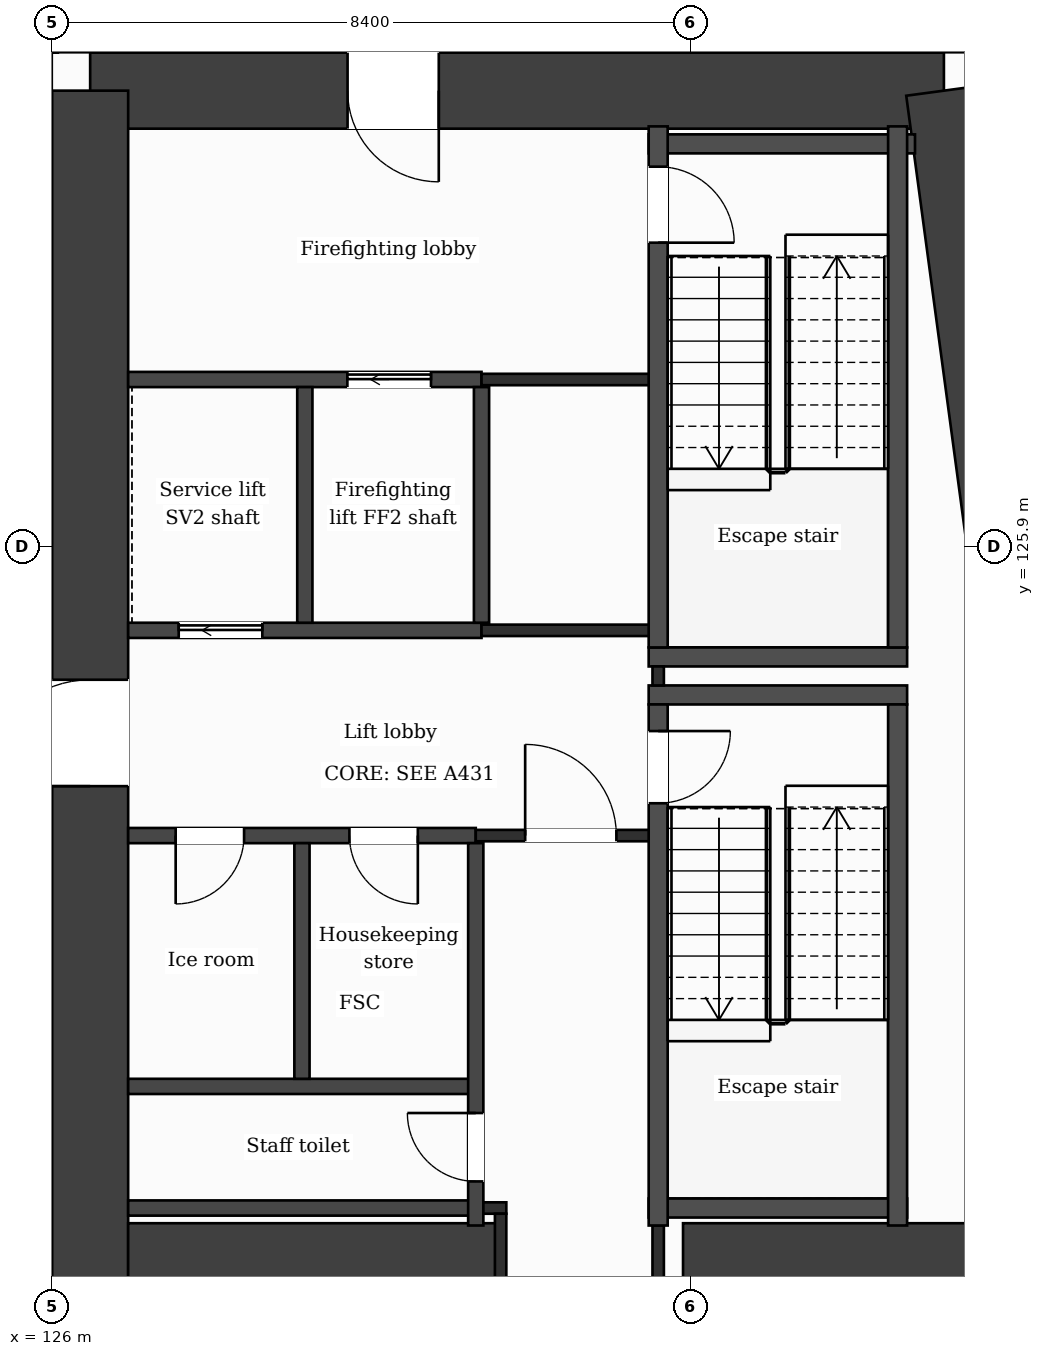
"""IFC4 building model, lengths in metres.
Left out: names, types, materials, properties, quantities, classifications, styles, units other than length and angle.
Written with IfcOpenShell. Run it as: python <this file> out.ifc"""

import sys

from ifc_helpers import new_model, si_unit, direction, frame, frame_2d, origin, place, context, subcontext, project, spatial, rectangle, extrude, element, fill, save


model = new_model("IFC4")
c1 = context("Model", 3, precision=1e-05, world=origin(), true_north=direction((0.0, 1.0)))
c2 = subcontext(c1, "Body", "Model", "MODEL_VIEW")
j1 = project(units=[si_unit("LENGTHUNIT", "METRE"), si_unit("PLANEANGLEUNIT", "RADIAN")], contexts=[c1])
p1 = place(None, origin())
s1 = spatial("IfcSite", under=j1, at=p1, CompositionType="ELEMENT")
p2 = place(p1, origin())
s2 = spatial("IfcBuilding", under=s1, at=p2, CompositionType="ELEMENT")
p3 = place(p2, frame((0.0, 0.0, 128.0)))
s3 = spatial("IfcBuildingStorey", under=s2, at=p3, CompositionType="ELEMENT", Elevation=128.0)
p4 = place(p3, frame((126.5, 131.9, 0.0), z_axis=(0.0, 0.0, 1.0), x_axis=(1.0, 0.0, 0.0)))
e1 = element("IfcWall", 1, at=p4, inside=s3, PredefinedType="SHEAR", context=c2, shape_type="SweptSolid", body=[
    extrude(rectangle(XDim=11.232, YDim=1.0, at=frame_2d((5.616, 0.0))), origin(), (0.0, 0.0, 1.0), 3.7),
])
p5 = place(p4, frame((3.386, 0.0, 0.0)))
e2 = element("IfcOpeningElement", 2, at=p5, cuts=e1, PredefinedType="OPENING", context=c2, shape_type="SweptSolid", body=[
    extrude(rectangle(XDim=1.2, YDim=2.1, at=frame_2d((0.6, 1.05))), frame((0.0, 0.51, 0.0), z_axis=(0.0, -1.0, 0.0), x_axis=(1.0, 0.0, 0.0)), (0.0, 0.0, 1.0), 1.02),
])
p6 = place(p3, frame((137.732, 131.9, 0.0), z_axis=(0.0, 0.0, 1.0), x_axis=(0.133411141623, -0.991060778808, 0.0)))
e3 = element("IfcWall", 3, at=p6, inside=s3, PredefinedType="SHEAR", context=c2, shape_type="SweptSolid", body=[
    extrude(rectangle(XDim=21.189, YDim=1.0, at=frame_2d((10.595, 0.0))), origin(), (0.0, 0.0, 1.0), 3.7),
])
p7 = place(p3, frame((126.5, 110.9, 0.0), z_axis=(0.0, 0.0, 1.0), x_axis=(0.0, 1.0, 0.0)))
e4 = element("IfcWall", 4, at=p7, inside=s3, PredefinedType="SHEAR", context=c2, shape_type="SweptSolid", body=[
    extrude(rectangle(XDim=21.0, YDim=1.0, at=frame_2d((10.5, 0.0))), origin(), (0.0, 0.0, 1.0), 3.7),
])
p8 = place(p7, frame((11.85, 0.0, 0.0)))
e5 = element("IfcOpeningElement", 5, at=p8, cuts=e4, PredefinedType="OPENING", context=c2, shape_type="SweptSolid", body=[
    extrude(rectangle(XDim=1.4, YDim=2.1, at=frame_2d((0.7, 1.05))), frame((0.0, 0.51, 0.0), z_axis=(0.0, -1.0, 0.0), x_axis=(1.0, 0.0, 0.0)), (0.0, 0.0, 1.0), 1.02),
])
p9 = place(p3, frame((127.0, 116.5, 0.0), z_axis=(0.0, 0.0, 1.0), x_axis=(1.0, 0.0, 0.0)))
e6 = element("IfcWall", 6, at=p9, inside=s3, PredefinedType="SHEAR", context=c2, shape_type="SweptSolid", body=[
    extrude(rectangle(XDim=4.9, YDim=1.0, at=frame_2d((2.45, 0.0))), origin(), (0.0, 0.0, 1.0), 3.7),
])
p10 = place(p3, frame((134.3, 116.5, 0.0), z_axis=(0.0, 0.0, 1.0), x_axis=(1.0, 0.0, 0.0)))
e7 = element("IfcWall", 7, at=p10, inside=s3, PredefinedType="SHEAR", context=c2, shape_type="SweptSolid", body=[
    extrude(rectangle(XDim=5.077, YDim=1.0, at=frame_2d((2.539, 0.0))), origin(), (0.0, 0.0, 1.0), 3.7),
])
p11 = place(p3, frame((136.504, 132.4, 0.0), z_axis=(0.0, 0.0, 1.0), x_axis=(-0.133399697462, 0.99106231929, 0.0)))
e8 = element("IfcWall", 8, at=p11, inside=s3, PredefinedType="SOLIDWALL", context=c2, shape_type="SweptSolid", body=[
    extrude(rectangle(XDim=6.74, YDim=0.3, at=frame_2d((3.37, 0.0))), origin(), (0.0, 0.0, 1.0), 3.38),
])
p12 = place(p11, frame((1.115, 0.0, 0.0)))
e9 = element("IfcOpeningElement", 9, at=p12, cuts=e8, PredefinedType="OPENING", context=c2, shape_type="SweptSolid", body=[
    extrude(rectangle(XDim=1.2, YDim=2.4, at=frame_2d((0.6, 1.2))), frame((0.0, 0.16, 0.0), z_axis=(0.0, -1.0, 0.0), x_axis=(1.0, 0.0, 0.0)), (0.0, 0.0, 1.0), 0.32),
])
p13 = place(p11, frame((3.835, 0.0, 0.9)))
e10 = element("IfcOpeningElement", 10, at=p13, cuts=e8, PredefinedType="OPENING", context=c2, shape_type="SweptSolid", body=[
    extrude(rectangle(XDim=2.4, YDim=2.1, at=frame_2d((1.2, 1.05))), frame((0.0, 0.16, 0.0), z_axis=(0.0, -1.0, 0.0), x_axis=(1.0, 0.0, 0.0)), (0.0, 0.0, 1.0), 0.32),
])
p14 = place(p3, frame((127.0, 117.2, 0.0), z_axis=(0.0, 0.0, 1.0), x_axis=(1.0, 0.0, 0.0)))
e11 = element("IfcWall", 11, at=p14, inside=s3, PredefinedType="PARTITIONING", context=c2, shape_type="SweptSolid", body=[
    extrude(rectangle(XDim=4.573, YDim=0.2, at=frame_2d((2.287, 0.0))), origin(), (0.0, 0.0, 1.0), 3.38),
])
p15 = place(p3, frame((131.573, 117.2, 0.0), z_axis=(0.0, 0.0, 1.0), x_axis=(1.0, 0.0, 0.0)))
e12 = element("IfcWall", 12, at=p15, inside=s3, PredefinedType="PARTITIONING", context=c2, shape_type="SweptSolid", body=[
    extrude(rectangle(XDim=0.402, YDim=0.15, at=frame_2d((0.201, 0.0))), origin(), (0.0, 0.0, 1.0), 3.38),
])
p16 = place(p3, frame((133.848, 117.2, 0.0), z_axis=(0.0, 0.0, 1.0), x_axis=(1.0, 0.0, 0.0)))
e13 = element("IfcWall", 13, at=p16, inside=s3, PredefinedType="PARTITIONING", context=c2, shape_type="SweptSolid", body=[
    extrude(rectangle(XDim=3.4, YDim=0.25, at=frame_2d((1.7, 0.0))), origin(), (0.0, 0.0, 1.0), 3.38),
])
p17 = place(p3, frame((127.0, 118.8, 0.0), z_axis=(0.0, 0.0, 1.0), x_axis=(1.0, 0.0, 0.0)))
e14 = element("IfcWall", 14, at=p17, inside=s3, PredefinedType="PARTITIONING", context=c2, shape_type="SweptSolid", body=[
    extrude(rectangle(XDim=4.573, YDim=0.2, at=frame_2d((2.287, 0.0))), origin(), (0.0, 0.0, 1.0), 3.38),
])
p18 = place(p3, frame((127.0, 122.1, 0.0), z_axis=(0.0, 0.0, 1.0), x_axis=(1.0, 0.0, 0.0)))
e15 = element("IfcWall", 15, at=p18, inside=s3, PredefinedType="PARTITIONING", context=c2, shape_type="SweptSolid", body=[
    extrude(rectangle(XDim=4.573, YDim=0.2, at=frame_2d((2.287, 0.0))), origin(), (0.0, 0.0, 1.0), 3.38),
])
p19 = place(p18, frame((2.911, 0.0, 0.0)))
e16 = element("IfcOpeningElement", 16, at=p19, cuts=e15, PredefinedType="OPENING", context=c2, shape_type="SweptSolid", body=[
    extrude(rectangle(XDim=0.9, YDim=2.1, at=frame_2d((0.45, 1.05))), frame((0.0, 0.11, 0.0), z_axis=(0.0, -1.0, 0.0), x_axis=(1.0, 0.0, 0.0)), (0.0, 0.0, 1.0), 0.22),
])
p20 = place(p18, frame((0.625, 0.0, 0.0)))
e17 = element("IfcOpeningElement", 17, at=p20, cuts=e15, PredefinedType="OPENING", context=c2, shape_type="SweptSolid", body=[
    extrude(rectangle(XDim=0.9, YDim=2.1, at=frame_2d((0.45, 1.05))), frame((0.0, 0.11, 0.0), z_axis=(0.0, -1.0, 0.0), x_axis=(1.0, 0.0, 0.0)), (0.0, 0.0, 1.0), 0.22),
])
p21 = place(p3, frame((131.573, 122.1, 0.0), z_axis=(0.0, 0.0, 1.0), x_axis=(1.0, 0.0, 0.0)))
e18 = element("IfcWall", 18, at=p21, inside=s3, PredefinedType="PARTITIONING", context=c2, shape_type="SweptSolid", body=[
    extrude(rectangle(XDim=2.4, YDim=0.15, at=frame_2d((1.2, 0.0))), origin(), (0.0, 0.0, 1.0), 3.38),
])
p22 = place(p21, frame((0.65, 0.0, 0.0)))
e19 = element("IfcOpeningElement", 19, at=p22, cuts=e18, PredefinedType="OPENING", context=c2, shape_type="SweptSolid", body=[
    extrude(rectangle(XDim=1.2, YDim=2.1, at=frame_2d((0.6, 1.05))), frame((0.0, 0.085, 0.0), z_axis=(0.0, -1.0, 0.0), x_axis=(1.0, 0.0, 0.0)), (0.0, 0.0, 1.0), 0.17),
])
p23 = place(p3, frame((100.8, 122.45, 0.0), z_axis=(0.0, 0.0, 1.0), x_axis=(1.0, 0.0, 0.0)))
e20 = element("IfcWall", 20, at=p23, inside=s3, PredefinedType="PARTITIONING", context=c2, shape_type="SweptSolid", body=[
    extrude(rectangle(XDim=25.2, YDim=0.15, at=frame_2d((12.6, 0.0))), origin(), (0.0, 0.0, 1.0), 3.38),
])
for number, where, z_axis, x_axis in (
    (21, (133.848, 123.95, 0.0), (0.0, 0.0, 1.0), (1.0, 0.0, 0.0)),
    (22, (133.848, 124.45, 0.0), (0.0, 0.0, 1.0), (1.0, 0.0, 0.0)),
):
    element("IfcWall", number, at=place(p3, frame(where, z_axis=z_axis, x_axis=x_axis)), inside=s3, PredefinedType="PARTITIONING", context=c2, shape_type="SweptSolid", body=[
        extrude(rectangle(XDim=3.4, YDim=0.25, at=frame_2d((1.7, 0.0))), origin(), (0.0, 0.0, 1.0), 3.38),
    ])
p24 = place(p3, frame((100.8, 124.45, 0.0), z_axis=(0.0, 0.0, 1.0), x_axis=(1.0, 0.0, 0.0)))
e23 = element("IfcWall", 23, at=p24, inside=s3, PredefinedType="PARTITIONING", context=c2, shape_type="SweptSolid", body=[
    extrude(rectangle(XDim=25.2, YDim=0.15, at=frame_2d((12.6, 0.0))), origin(), (0.0, 0.0, 1.0), 3.38),
])
p25 = place(p24, frame((2.025, 0.0, 0.0)))
e24 = element("IfcOpeningElement", 24, at=p25, cuts=e23, PredefinedType="OPENING", context=c2, shape_type="SweptSolid", body=[
    extrude(rectangle(XDim=1.0, YDim=2.1, at=frame_2d((0.5, 1.05))), frame((0.0, 0.085, 0.0), z_axis=(0.0, -1.0, 0.0), x_axis=(1.0, 0.0, 0.0)), (0.0, 0.0, 1.0), 0.17),
])
p26 = place(p24, frame((12.1, 0.0, 0.0)))
e25 = element("IfcOpeningElement", 25, at=p26, cuts=e23, PredefinedType="OPENING", context=c2, shape_type="SweptSolid", body=[
    extrude(rectangle(XDim=1.0, YDim=2.1, at=frame_2d((0.5, 1.05))), frame((0.0, 0.085, 0.0), z_axis=(0.0, -1.0, 0.0), x_axis=(1.0, 0.0, 0.0)), (0.0, 0.0, 1.0), 0.17),
])
p27 = place(p24, frame((17.54, 0.0, 0.0)))
e26 = element("IfcOpeningElement", 26, at=p27, cuts=e23, PredefinedType="OPENING", context=c2, shape_type="SweptSolid", body=[
    extrude(rectangle(XDim=1.0, YDim=2.1, at=frame_2d((0.5, 1.05))), frame((0.0, 0.085, 0.0), z_axis=(0.0, -1.0, 0.0), x_axis=(1.0, 0.0, 0.0)), (0.0, 0.0, 1.0), 0.17),
])
p28 = place(p24, frame((22.85, 0.0, 0.0)))
e27 = element("IfcOpeningElement", 27, at=p28, cuts=e23, PredefinedType="OPENING", context=c2, shape_type="SweptSolid", body=[
    extrude(rectangle(XDim=1.0, YDim=2.1, at=frame_2d((0.5, 1.05))), frame((0.0, 0.085, 0.0), z_axis=(0.0, -1.0, 0.0), x_axis=(1.0, 0.0, 0.0)), (0.0, 0.0, 1.0), 0.17),
])
p29 = place(p3, frame((127.0, 124.8, 0.0), z_axis=(0.0, 0.0, 1.0), x_axis=(1.0, 0.0, 0.0)))
e28 = element("IfcWall", 28, at=p29, inside=s3, PredefinedType="PARTITIONING", context=c2, shape_type="SweptSolid", body=[
    extrude(rectangle(XDim=4.649, YDim=0.2, at=frame_2d((2.324, 0.0))), origin(), (0.0, 0.0, 1.0), 3.38),
])
p30 = place(p29, frame((0.665, 0.0, 0.0)))
e29 = element("IfcOpeningElement", 29, at=p30, cuts=e28, PredefinedType="OPENING", context=c2, shape_type="SweptSolid", body=[
    extrude(rectangle(XDim=1.1, YDim=2.1, at=frame_2d((0.55, 1.05))), frame((0.0, 0.11, 0.0), z_axis=(0.0, -1.0, 0.0), x_axis=(1.0, 0.0, 0.0)), (0.0, 0.0, 1.0), 0.22),
])
p31 = place(p3, frame((131.649, 124.8, 0.0), z_axis=(0.0, 0.0, 1.0), x_axis=(1.0, 0.0, 0.0)))
e30 = element("IfcWall", 30, at=p31, inside=s3, PredefinedType="PARTITIONING", context=c2, shape_type="SweptSolid", body=[
    extrude(rectangle(XDim=2.449, YDim=0.15, at=frame_2d((1.225, 0.0))), origin(), (0.0, 0.0, 1.0), 3.38),
])
p32 = place(p3, frame((127.0, 128.1, 0.0), z_axis=(0.0, 0.0, 1.0), x_axis=(1.0, 0.0, 0.0)))
e31 = element("IfcWall", 31, at=p32, inside=s3, PredefinedType="PARTITIONING", context=c2, shape_type="SweptSolid", body=[
    extrude(rectangle(XDim=4.649, YDim=0.2, at=frame_2d((2.324, 0.0))), origin(), (0.0, 0.0, 1.0), 3.38),
])
p33 = place(p32, frame((2.884, 0.0, 0.0)))
e32 = element("IfcOpeningElement", 32, at=p33, cuts=e31, PredefinedType="OPENING", context=c2, shape_type="SweptSolid", body=[
    extrude(rectangle(XDim=1.1, YDim=2.1, at=frame_2d((0.55, 1.05))), frame((0.0, 0.11, 0.0), z_axis=(0.0, -1.0, 0.0), x_axis=(1.0, 0.0, 0.0)), (0.0, 0.0, 1.0), 0.22),
])
p34 = place(p3, frame((131.649, 128.1, 0.0), z_axis=(0.0, 0.0, 1.0), x_axis=(1.0, 0.0, 0.0)))
e33 = element("IfcWall", 33, at=p34, inside=s3, PredefinedType="PARTITIONING", context=c2, shape_type="SweptSolid", body=[
    extrude(rectangle(XDim=2.324, YDim=0.15, at=frame_2d((1.162, 0.0))), origin(), (0.0, 0.0, 1.0), 3.38),
])
p35 = place(p3, frame((133.848, 131.2, 0.0), z_axis=(0.0, 0.0, 1.0), x_axis=(1.0, 0.0, 0.0)))
e34 = element("IfcWall", 34, at=p35, inside=s3, PredefinedType="PARTITIONING", context=c2, shape_type="SweptSolid", body=[
    extrude(rectangle(XDim=3.504, YDim=0.25, at=frame_2d((1.752, 0.0))), origin(), (0.0, 0.0, 1.0), 3.38),
])
for number, where, z_axis, x_axis in (
    (35, (129.287, 118.9, 0.0), (0.0, 0.0, 1.0), (0.0, 1.0, 0.0)),
    (36, (129.324, 124.9, 0.0), (0.0, 0.0, 1.0), (0.0, 1.0, 0.0)),
):
    element("IfcWall", number, at=place(p3, frame(where, z_axis=z_axis, x_axis=x_axis)), inside=s3, PredefinedType="PARTITIONING", context=c2, shape_type="SweptSolid", body=[
        extrude(rectangle(XDim=3.1, YDim=0.2, at=frame_2d((1.55, 0.0))), origin(), (0.0, 0.0, 1.0), 3.38),
    ])
p36 = place(p3, frame((131.573, 116.97, 0.0), z_axis=(0.0, 0.0, 1.0), x_axis=(0.0, 1.0, 0.0)))
e37 = element("IfcWall", 37, at=p36, inside=s3, PredefinedType="PARTITIONING", context=c2, shape_type="SweptSolid", body=[
    extrude(rectangle(XDim=5.03, YDim=0.2, at=frame_2d((2.515, 0.0))), origin(), (0.0, 0.0, 1.0), 3.38),
])
p37 = place(p36, frame((0.58, 0.0, 0.0)))
e38 = element("IfcOpeningElement", 38, at=p37, cuts=e37, PredefinedType="OPENING", context=c2, shape_type="SweptSolid", body=[
    extrude(rectangle(XDim=0.9, YDim=2.1, at=frame_2d((0.45, 1.05))), frame((0.0, 0.11, 0.0), z_axis=(0.0, -1.0, 0.0), x_axis=(1.0, 0.0, 0.0)), (0.0, 0.0, 1.0), 0.22),
])
p38 = place(p3, frame((131.649, 124.9, 0.0), z_axis=(0.0, 0.0, 1.0), x_axis=(0.0, 1.0, 0.0)))
e39 = element("IfcWall", 39, at=p38, inside=s3, PredefinedType="PARTITIONING", context=c2, shape_type="SweptSolid", body=[
    extrude(rectangle(XDim=3.1, YDim=0.2, at=frame_2d((1.55, 0.0))), origin(), (0.0, 0.0, 1.0), 3.38),
])
p39 = place(p3, frame((131.9, 116.0, 0.0), z_axis=(0.0, 0.0, 1.0), x_axis=(0.0, 1.0, 0.0)))
e40 = element("IfcWall", 40, at=p39, inside=s3, PredefinedType="PARTITIONING", context=c2, shape_type="SweptSolid", body=[
    extrude(rectangle(XDim=1.125, YDim=0.15, at=frame_2d((0.562, 0.0))), origin(), (0.0, 0.0, 1.0), 3.38),
])
p40 = place(p3, frame((133.973, 116.0, 0.0), z_axis=(0.0, 0.0, 1.0), x_axis=(0.0, 1.0, 0.0)))
e41 = element("IfcWall", 41, at=p40, inside=s3, PredefinedType="PARTITIONING", context=c2, shape_type="SweptSolid", body=[
    extrude(rectangle(XDim=0.97, YDim=0.15, at=frame_2d((0.485, 0.0))), origin(), (0.0, 0.0, 1.0), 3.38),
])
p41 = place(p3, frame((133.973, 124.075, 0.0), z_axis=(0.0, 0.0, 1.0), x_axis=(0.0, 1.0, 0.0)))
e42 = element("IfcWall", 42, at=p41, inside=s3, PredefinedType="PARTITIONING", context=c2, shape_type="SweptSolid", body=[
    extrude(rectangle(XDim=0.25, YDim=0.15, at=frame_2d((0.125, 0.0))), origin(), (0.0, 0.0, 1.0), 3.38),
])
p42 = place(p3, frame((133.973, 116.97, 0.0), z_axis=(0.0, 0.0, 1.0), x_axis=(0.0, 1.0, 0.0)))
e43 = element("IfcWall", 43, at=p42, inside=s3, PredefinedType="PARTITIONING", context=c2, shape_type="SweptSolid", body=[
    extrude(rectangle(XDim=6.855, YDim=0.25, at=frame_2d((3.427, 0.0))), origin(), (0.0, 0.0, 1.0), 3.38),
])
p43 = place(p42, frame((5.555, 0.0, 0.0)))
e44 = element("IfcOpeningElement", 44, at=p43, cuts=e43, PredefinedType="OPENING", context=c2, shape_type="SweptSolid", body=[
    extrude(rectangle(XDim=0.95, YDim=2.1, at=frame_2d((0.475, 1.05))), frame((0.0, 0.135, 0.0), z_axis=(0.0, -1.0, 0.0), x_axis=(1.0, 0.0, 0.0)), (0.0, 0.0, 1.0), 0.27),
])
p44 = place(p3, frame((133.973, 124.575, 0.0), z_axis=(0.0, 0.0, 1.0), x_axis=(0.0, 1.0, 0.0)))
e45 = element("IfcWall", 45, at=p44, inside=s3, PredefinedType="PARTITIONING", context=c2, shape_type="SweptSolid", body=[
    extrude(rectangle(XDim=6.855, YDim=0.25, at=frame_2d((3.427, 0.0))), origin(), (0.0, 0.0, 1.0), 3.38),
])
p45 = place(p44, frame((5.325, 0.0, 0.0)))
e46 = element("IfcOpeningElement", 46, at=p45, cuts=e45, PredefinedType="OPENING", context=c2, shape_type="SweptSolid", body=[
    extrude(rectangle(XDim=1.0, YDim=2.1, at=frame_2d((0.5, 1.05))), frame((0.0, 0.135, 0.0), z_axis=(0.0, -1.0, 0.0), x_axis=(1.0, 0.0, 0.0)), (0.0, 0.0, 1.0), 0.27),
])
for number, where, z_axis, x_axis in (
    (47, (137.123, 116.97, 0.0), (0.0, 0.0, 1.0), (0.0, 1.0, 0.0)),
    (48, (137.123, 124.575, 0.0), (0.0, 0.0, 1.0), (0.0, 1.0, 0.0)),
):
    element("IfcWall", number, at=place(p3, frame(where, z_axis=z_axis, x_axis=x_axis)), inside=s3, PredefinedType="PARTITIONING", context=c2, shape_type="SweptSolid", body=[
        extrude(rectangle(XDim=6.855, YDim=0.25, at=frame_2d((3.427, 0.0))), origin(), (0.0, 0.0, 1.0), 3.38),
    ])
p46 = place(p22, origin())
e49 = element("IfcDoor", 49, at=p46, inside=s3, OperationType="SINGLE_SWING_LEFT", PredefinedType="DOOR", context=c2, shape_type="SweptSolid", body=[
    extrude(rectangle(XDim=1.2, YDim=2.1, at=frame_2d((0.6, 1.05))), frame((0.0, 0.025, 0.0), z_axis=(0.0, -1.0, 0.0), x_axis=(1.0, 0.0, 0.0)), (0.0, 0.0, 1.0), 0.05),
])
fill(e19, e49)
p47 = place(p33, origin())
e50 = element("IfcDoor", 50, at=p47, inside=s3, OperationType="SLIDING_TO_LEFT", PredefinedType="DOOR", context=c2, shape_type="SweptSolid", body=[
    extrude(rectangle(XDim=1.1, YDim=2.1, at=frame_2d((0.55, 1.05))), frame((0.0, 0.025, 0.0), z_axis=(0.0, -1.0, 0.0), x_axis=(1.0, 0.0, 0.0)), (0.0, 0.0, 1.0), 0.05),
])
fill(e32, e50)
p48 = place(p30, origin())
e51 = element("IfcDoor", 51, at=p48, inside=s3, OperationType="SLIDING_TO_LEFT", PredefinedType="DOOR", context=c2, shape_type="SweptSolid", body=[
    extrude(rectangle(XDim=1.1, YDim=2.1, at=frame_2d((0.55, 1.05))), frame((0.0, 0.025, 0.0), z_axis=(0.0, -1.0, 0.0), x_axis=(1.0, 0.0, 0.0)), (0.0, 0.0, 1.0), 0.05),
])
fill(e29, e51)
p49 = place(p19, origin())
e52 = element("IfcDoor", 52, at=p49, inside=s3, OperationType="SINGLE_SWING_RIGHT", PredefinedType="DOOR", context=c2, shape_type="SweptSolid", body=[
    extrude(rectangle(XDim=0.9, YDim=2.1, at=frame_2d((0.45, 1.05))), frame((0.0, 0.025, 0.0), z_axis=(0.0, -1.0, 0.0), x_axis=(1.0, 0.0, 0.0)), (0.0, 0.0, 1.0), 0.05),
])
fill(e16, e52)
p50 = place(p20, origin())
e53 = element("IfcDoor", 53, at=p50, inside=s3, OperationType="SINGLE_SWING_LEFT", PredefinedType="DOOR", context=c2, shape_type="SweptSolid", body=[
    extrude(rectangle(XDim=0.9, YDim=2.1, at=frame_2d((0.45, 1.05))), frame((0.0, 0.025, 0.0), z_axis=(0.0, -1.0, 0.0), x_axis=(1.0, 0.0, 0.0)), (0.0, 0.0, 1.0), 0.05),
])
fill(e17, e53)
p51 = place(p43, origin())
e54 = element("IfcDoor", 54, at=p51, inside=s3, OperationType="SINGLE_SWING_RIGHT", PredefinedType="DOOR", context=c2, shape_type="SweptSolid", body=[
    extrude(rectangle(XDim=0.95, YDim=2.1, at=frame_2d((0.475, 1.05))), frame((0.0, 0.025, 0.0), z_axis=(0.0, -1.0, 0.0), x_axis=(1.0, 0.0, 0.0)), (0.0, 0.0, 1.0), 0.05),
])
fill(e44, e54)
p52 = place(p45, origin())
e55 = element("IfcDoor", 55, at=p52, inside=s3, OperationType="SINGLE_SWING_LEFT", PredefinedType="DOOR", context=c2, shape_type="SweptSolid", body=[
    extrude(rectangle(XDim=1.0, YDim=2.1, at=frame_2d((0.5, 1.05))), frame((0.0, 0.025, 0.0), z_axis=(0.0, -1.0, 0.0), x_axis=(1.0, 0.0, 0.0)), (0.0, 0.0, 1.0), 0.05),
])
fill(e46, e55)
p53 = place(p37, origin())
e56 = element("IfcDoor", 56, at=p53, inside=s3, OperationType="SINGLE_SWING_RIGHT", PredefinedType="DOOR", context=c2, shape_type="SweptSolid", body=[
    extrude(rectangle(XDim=0.9, YDim=2.1, at=frame_2d((0.45, 1.05))), frame((0.0, 0.025, 0.0), z_axis=(0.0, -1.0, 0.0), x_axis=(1.0, 0.0, 0.0)), (0.0, 0.0, 1.0), 0.05),
])
fill(e38, e56)
p54 = place(p5, origin())
e57 = element("IfcDoor", 57, at=p54, inside=s3, OperationType="SINGLE_SWING_RIGHT", PredefinedType="DOOR", context=c2, shape_type="SweptSolid", body=[
    extrude(rectangle(XDim=1.2, YDim=2.1, at=frame_2d((0.6, 1.05))), frame((0.0, 0.025, 0.0), z_axis=(0.0, -1.0, 0.0), x_axis=(1.0, 0.0, 0.0)), (0.0, 0.0, 1.0), 0.05),
])
fill(e2, e57)
p55 = place(p8, origin())
e58 = element("IfcDoor", 58, at=p55, inside=s3, OperationType="SINGLE_SWING_LEFT", PredefinedType="DOOR", context=c2, shape_type="SweptSolid", body=[
    extrude(rectangle(XDim=1.4, YDim=2.1, at=frame_2d((0.7, 1.05))), frame((0.0, 0.025, 0.0), z_axis=(0.0, -1.0, 0.0), x_axis=(1.0, 0.0, 0.0)), (0.0, 0.0, 1.0), 0.05),
])
fill(e5, e58)
save(model, sys.argv[1])
